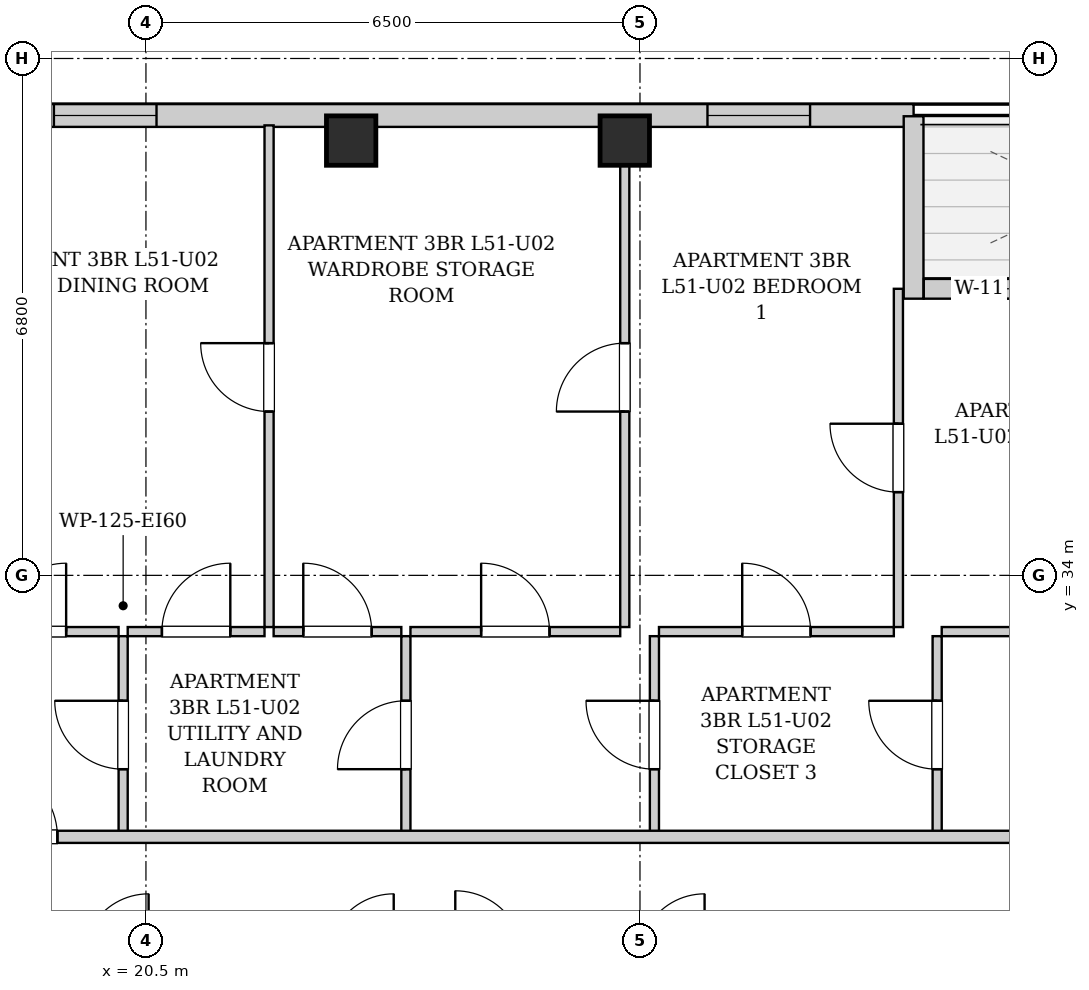
"""IFC4 building model, lengths in metres.
Left out: names, types, materials, properties, quantities, classifications, styles, units other than length and angle.
Written with IfcOpenShell. Run it as: python <this file> out.ifc"""

import sys

from ifc_helpers import new_model, si_unit, direction, frame, frame_2d, origin, origin_2d, place, context, subcontext, project, spatial, rectangle, extrude, element, fill, save


model = new_model("IFC4")
c1 = context("Model", 3, precision=1e-05, world=origin(), true_north=direction((0.0, 1.0)))
c2 = subcontext(c1, "Body", "Model", "MODEL_VIEW")
j1 = project(units=[si_unit("LENGTHUNIT", "METRE"), si_unit("PLANEANGLEUNIT", "RADIAN")], contexts=[c1])
p1 = place(None, origin())
s1 = spatial("IfcSite", under=j1, at=p1, CompositionType="ELEMENT")
p2 = place(p1, origin())
s2 = spatial("IfcBuilding", under=s1, at=p2, CompositionType="ELEMENT")
p3 = place(p2, frame((0.0, 0.0, 177.7)))
s3 = spatial("IfcBuildingStorey", under=s2, at=p3, CompositionType="ELEMENT", Elevation=177.7)
for number, where, z_axis, x_axis in (
    (1, (23.2, 39.72, 0.0), (0.0, 0.0, 1.0), (1.0, 0.0, 0.0)),
    (2, (26.8, 39.72, 0.0), (0.0, 0.0, 1.0), (1.0, 0.0, 0.0)),
):
    element("IfcColumn", number, at=place(p3, frame(where, z_axis=z_axis, x_axis=x_axis)), inside=s3, PredefinedType="COLUMN", context=c2, shape_type="SweptSolid", body=[
        extrude(rectangle(XDim=0.65, YDim=0.65, at=origin_2d()), origin(), (0.0, 0.0, 1.0), 3.3),
    ])
p4 = place(p3, frame((13.1, 40.05, 0.0), z_axis=(0.0, 0.0, 1.0), x_axis=(1.0, 0.0, 0.0)))
e3 = element("IfcWall", 3, at=p4, inside=s3, PredefinedType="SOLIDWALL", context=c2, shape_type="SweptSolid", body=[
    extrude(rectangle(XDim=17.5, YDim=0.3, at=frame_2d((8.75, 0.0))), origin(), (0.0, 0.0, 1.0), 3.04),
])
p5 = place(p4, frame((1.815, 0.0, 0.55)))
e4 = element("IfcOpeningElement", 4, at=p5, cuts=e3, PredefinedType="OPENING", context=c2, shape_type="SweptSolid", body=[
    extrude(rectangle(XDim=1.35, YDim=1.2, at=frame_2d((0.675, 0.6))), frame((0.0, 0.16, 0.0), z_axis=(0.0, -1.0, 0.0), x_axis=(1.0, 0.0, 0.0)), (0.0, 0.0, 1.0), 0.32),
])
p6 = place(p4, frame((6.189, 0.0, 0.55)))
e5 = element("IfcOpeningElement", 5, at=p6, cuts=e3, PredefinedType="OPENING", context=c2, shape_type="SweptSolid", body=[
    extrude(rectangle(XDim=1.35, YDim=1.2, at=frame_2d((0.675, 0.6))), frame((0.0, 0.16, 0.0), z_axis=(0.0, -1.0, 0.0), x_axis=(1.0, 0.0, 0.0)), (0.0, 0.0, 1.0), 0.32),
])
p7 = place(p4, frame((14.788, 0.0, 0.55)))
e6 = element("IfcOpeningElement", 6, at=p7, cuts=e3, PredefinedType="OPENING", context=c2, shape_type="SweptSolid", body=[
    extrude(rectangle(XDim=1.35, YDim=1.2, at=frame_2d((0.675, 0.6))), frame((0.0, 0.16, 0.0), z_axis=(0.0, -1.0, 0.0), x_axis=(1.0, 0.0, 0.0)), (0.0, 0.0, 1.0), 0.32),
])
p8 = place(p3, frame((30.6, 40.04, 0.0), z_axis=(0.0, 0.0, 1.0), x_axis=(0.0, -1.0, 0.0)))
e7 = element("IfcWall", 7, at=p8, inside=s3, PredefinedType="SOLIDWALL", context=c2, shape_type="SweptSolid", body=[
    extrude(rectangle(XDim=2.4, YDim=0.26, at=frame_2d((1.2, 0.0))), origin(), (0.0, 0.0, 1.0), 3.04),
])
p9 = place(p3, frame((30.734, 37.77, 0.0), z_axis=(0.0, 0.0, 1.0), x_axis=(1.0, 0.0, 0.0)))
e8 = element("IfcWall", 8, at=p9, inside=s3, PredefinedType="SOLIDWALL", context=c2, shape_type="SweptSolid", body=[
    extrude(rectangle(XDim=4.332, YDim=0.26, at=frame_2d((2.166, 0.0))), origin(), (0.0, 0.0, 1.0), 3.04),
])
p10 = place(p9, frame((1.616, 0.0, 0.0)))
e9 = element("IfcOpeningElement", 9, at=p10, cuts=e8, PredefinedType="OPENING", context=c2, shape_type="SweptSolid", body=[
    extrude(rectangle(XDim=1.1, YDim=2.0, at=frame_2d((0.55, 1.0))), frame((0.0, 0.14, 0.0), z_axis=(0.0, -1.0, 0.0), x_axis=(1.0, 0.0, 0.0)), (0.0, 0.0, 1.0), 0.28),
])
p11 = place(p9, frame((0.606, 0.0, 0.55)))
e10 = element("IfcOpeningElement", 10, at=p11, cuts=e8, PredefinedType="OPENING", context=c2, shape_type="SweptSolid", body=[
    extrude(rectangle(XDim=0.85, YDim=1.2, at=frame_2d((0.425, 0.6))), frame((0.0, 0.14, 0.0), z_axis=(0.0, -1.0, 0.0), x_axis=(1.0, 0.0, 0.0)), (0.0, 0.0, 1.0), 0.28),
])
p12 = place(p3, frame((20.2, 30.6, 0.0), z_axis=(0.0, 0.0, 1.0), x_axis=(0.0, 1.0, 0.0)))
e11 = element("IfcWall", 11, at=p12, inside=s3, PredefinedType="PARTITIONING", context=c2, shape_type="SweptSolid", body=[
    extrude(rectangle(XDim=2.6, YDim=0.12, at=frame_2d((1.3, 0.0))), origin(), (0.0, 0.0, 1.0), 3.04),
])
p13 = place(p12, frame((0.85, 0.0, 0.0)))
e12 = element("IfcOpeningElement", 12, at=p13, cuts=e11, PredefinedType="OPENING", context=c2, shape_type="SweptSolid", body=[
    extrude(rectangle(XDim=0.9, YDim=2.05, at=frame_2d((0.45, 1.025))), frame((0.0, 0.07, 0.0), z_axis=(0.0, -1.0, 0.0), x_axis=(1.0, 0.0, 0.0)), (0.0, 0.0, 1.0), 0.14),
])
p14 = place(p3, frame((17.86, 33.26, 0.0), z_axis=(0.0, 0.0, 1.0), x_axis=(1.0, 0.0, 0.0)))
e13 = element("IfcWall", 13, at=p14, inside=s3, PredefinedType="PARTITIONING", context=c2, shape_type="SweptSolid", body=[
    extrude(rectangle(XDim=2.28, YDim=0.12, at=frame_2d((1.14, 0.0))), origin(), (0.0, 0.0, 1.0), 3.04),
])
p15 = place(p14, frame((0.69, 0.0, 0.0)))
e14 = element("IfcOpeningElement", 14, at=p15, cuts=e13, PredefinedType="OPENING", context=c2, shape_type="SweptSolid", body=[
    extrude(rectangle(XDim=0.9, YDim=2.05, at=frame_2d((0.45, 1.025))), frame((0.0, 0.07, 0.0), z_axis=(0.0, -1.0, 0.0), x_axis=(1.0, 0.0, 0.0)), (0.0, 0.0, 1.0), 0.14),
])
p16 = place(p3, frame((23.92, 30.6, 0.0), z_axis=(0.0, 0.0, 1.0), x_axis=(0.0, 1.0, 0.0)))
e15 = element("IfcWall", 15, at=p16, inside=s3, PredefinedType="PARTITIONING", context=c2, shape_type="SweptSolid", body=[
    extrude(rectangle(XDim=2.6, YDim=0.12, at=frame_2d((1.3, 0.0))), origin(), (0.0, 0.0, 1.0), 3.04),
])
p17 = place(p16, frame((0.85, 0.0, 0.0)))
e16 = element("IfcOpeningElement", 16, at=p17, cuts=e15, PredefinedType="OPENING", context=c2, shape_type="SweptSolid", body=[
    extrude(rectangle(XDim=0.9, YDim=2.05, at=frame_2d((0.45, 1.025))), frame((0.0, 0.07, 0.0), z_axis=(0.0, -1.0, 0.0), x_axis=(1.0, 0.0, 0.0)), (0.0, 0.0, 1.0), 0.14),
])
p18 = place(p3, frame((20.26, 33.26, 0.0), z_axis=(0.0, 0.0, 1.0), x_axis=(1.0, 0.0, 0.0)))
e17 = element("IfcWall", 17, at=p18, inside=s3, PredefinedType="PARTITIONING", context=c2, shape_type="SweptSolid", body=[
    extrude(rectangle(XDim=1.8, YDim=0.12, at=frame_2d((0.9, 0.0))), origin(), (0.0, 0.0, 1.0), 3.04),
])
p19 = place(p18, frame((0.45, 0.0, 0.0)))
e18 = element("IfcOpeningElement", 18, at=p19, cuts=e17, PredefinedType="OPENING", context=c2, shape_type="SweptSolid", body=[
    extrude(rectangle(XDim=0.9, YDim=2.05, at=frame_2d((0.45, 1.025))), frame((0.0, 0.07, 0.0), z_axis=(0.0, -1.0, 0.0), x_axis=(1.0, 0.0, 0.0)), (0.0, 0.0, 1.0), 0.14),
])
p20 = place(p3, frame((22.18, 33.26, 0.0), z_axis=(0.0, 0.0, 1.0), x_axis=(1.0, 0.0, 0.0)))
e19 = element("IfcWall", 19, at=p20, inside=s3, PredefinedType="PARTITIONING", context=c2, shape_type="SweptSolid", body=[
    extrude(rectangle(XDim=1.68, YDim=0.12, at=frame_2d((0.84, 0.0))), origin(), (0.0, 0.0, 1.0), 3.04),
])
p21 = place(p20, frame((0.39, 0.0, 0.0)))
e20 = element("IfcOpeningElement", 20, at=p21, cuts=e19, PredefinedType="OPENING", context=c2, shape_type="SweptSolid", body=[
    extrude(rectangle(XDim=0.9, YDim=2.05, at=frame_2d((0.45, 1.025))), frame((0.0, 0.07, 0.0), z_axis=(0.0, -1.0, 0.0), x_axis=(1.0, 0.0, 0.0)), (0.0, 0.0, 1.0), 0.14),
])
p22 = place(p3, frame((27.19, 30.6, 0.0), z_axis=(0.0, 0.0, 1.0), x_axis=(0.0, 1.0, 0.0)))
e21 = element("IfcWall", 21, at=p22, inside=s3, PredefinedType="PARTITIONING", context=c2, shape_type="SweptSolid", body=[
    extrude(rectangle(XDim=2.6, YDim=0.12, at=frame_2d((1.3, 0.0))), origin(), (0.0, 0.0, 1.0), 3.04),
])
p23 = place(p22, frame((0.85, 0.0, 0.0)))
e22 = element("IfcOpeningElement", 22, at=p23, cuts=e21, PredefinedType="OPENING", context=c2, shape_type="SweptSolid", body=[
    extrude(rectangle(XDim=0.9, YDim=2.05, at=frame_2d((0.45, 1.025))), frame((0.0, 0.07, 0.0), z_axis=(0.0, -1.0, 0.0), x_axis=(1.0, 0.0, 0.0)), (0.0, 0.0, 1.0), 0.14),
])
p24 = place(p3, frame((23.98, 33.26, 0.0), z_axis=(0.0, 0.0, 1.0), x_axis=(1.0, 0.0, 0.0)))
e23 = element("IfcWall", 23, at=p24, inside=s3, PredefinedType="PARTITIONING", context=c2, shape_type="SweptSolid", body=[
    extrude(rectangle(XDim=2.76, YDim=0.12, at=frame_2d((1.38, 0.0))), origin(), (0.0, 0.0, 1.0), 3.04),
])
p25 = place(p24, frame((0.93, 0.0, 0.0)))
e24 = element("IfcOpeningElement", 24, at=p25, cuts=e23, PredefinedType="OPENING", context=c2, shape_type="SweptSolid", body=[
    extrude(rectangle(XDim=0.9, YDim=2.05, at=frame_2d((0.45, 1.025))), frame((0.0, 0.07, 0.0), z_axis=(0.0, -1.0, 0.0), x_axis=(1.0, 0.0, 0.0)), (0.0, 0.0, 1.0), 0.14),
])
p26 = place(p3, frame((30.91, 30.6, 0.0), z_axis=(0.0, 0.0, 1.0), x_axis=(0.0, 1.0, 0.0)))
e25 = element("IfcWall", 25, at=p26, inside=s3, PredefinedType="PARTITIONING", context=c2, shape_type="SweptSolid", body=[
    extrude(rectangle(XDim=2.6, YDim=0.12, at=frame_2d((1.3, 0.0))), origin(), (0.0, 0.0, 1.0), 3.04),
])
p27 = place(p26, frame((0.85, 0.0, 0.0)))
e26 = element("IfcOpeningElement", 26, at=p27, cuts=e25, PredefinedType="OPENING", context=c2, shape_type="SweptSolid", body=[
    extrude(rectangle(XDim=0.9, YDim=2.05, at=frame_2d((0.45, 1.025))), frame((0.0, 0.07, 0.0), z_axis=(0.0, -1.0, 0.0), x_axis=(1.0, 0.0, 0.0)), (0.0, 0.0, 1.0), 0.14),
])
p28 = place(p3, frame((27.25, 33.26, 0.0), z_axis=(0.0, 0.0, 1.0), x_axis=(1.0, 0.0, 0.0)))
e27 = element("IfcWall", 27, at=p28, inside=s3, PredefinedType="PARTITIONING", context=c2, shape_type="SweptSolid", body=[
    extrude(rectangle(XDim=3.09, YDim=0.12, at=frame_2d((1.545, 0.0))), origin(), (0.0, 0.0, 1.0), 3.04),
])
p29 = place(p28, frame((1.095, 0.0, 0.0)))
e28 = element("IfcOpeningElement", 28, at=p29, cuts=e27, PredefinedType="OPENING", context=c2, shape_type="SweptSolid", body=[
    extrude(rectangle(XDim=0.9, YDim=2.05, at=frame_2d((0.45, 1.025))), frame((0.0, 0.07, 0.0), z_axis=(0.0, -1.0, 0.0), x_axis=(1.0, 0.0, 0.0)), (0.0, 0.0, 1.0), 0.14),
])
p30 = place(p3, frame((30.97, 33.26, 0.0), z_axis=(0.0, 0.0, 1.0), x_axis=(1.0, 0.0, 0.0)))
e29 = element("IfcWall", 29, at=p30, inside=s3, PredefinedType="PARTITIONING", context=c2, shape_type="SweptSolid", body=[
    extrude(rectangle(XDim=3.15, YDim=0.12, at=frame_2d((1.575, 0.0))), origin(), (0.0, 0.0, 1.0), 3.04),
])
p31 = place(p30, frame((1.125, 0.0, 0.0)))
e30 = element("IfcOpeningElement", 30, at=p31, cuts=e29, PredefinedType="OPENING", context=c2, shape_type="SweptSolid", body=[
    extrude(rectangle(XDim=0.9, YDim=2.05, at=frame_2d((0.45, 1.025))), frame((0.0, 0.07, 0.0), z_axis=(0.0, -1.0, 0.0), x_axis=(1.0, 0.0, 0.0)), (0.0, 0.0, 1.0), 0.14),
])
p32 = place(p3, frame((22.12, 33.32, 0.0), z_axis=(0.0, 0.0, 1.0), x_axis=(0.0, 1.0, 0.0)))
e31 = element("IfcWall", 31, at=p32, inside=s3, PredefinedType="PARTITIONING", context=c2, shape_type="SweptSolid", body=[
    extrude(rectangle(XDim=6.6, YDim=0.12, at=frame_2d((3.3, 0.0))), origin(), (0.0, 0.0, 1.0), 3.04),
])
p33 = place(p32, frame((2.835, 0.0, 0.0)))
e32 = element("IfcOpeningElement", 32, at=p33, cuts=e31, PredefinedType="OPENING", context=c2, shape_type="SweptSolid", body=[
    extrude(rectangle(XDim=0.9, YDim=2.05, at=frame_2d((0.45, 1.025))), frame((0.0, 0.07, 0.0), z_axis=(0.0, -1.0, 0.0), x_axis=(1.0, 0.0, 0.0)), (0.0, 0.0, 1.0), 0.14),
])
p34 = place(p3, frame((26.8, 33.32, 0.0), z_axis=(0.0, 0.0, 1.0), x_axis=(0.0, 1.0, 0.0)))
e33 = element("IfcWall", 33, at=p34, inside=s3, PredefinedType="PARTITIONING", context=c2, shape_type="SweptSolid", body=[
    extrude(rectangle(XDim=6.6, YDim=0.12, at=frame_2d((3.3, 0.0))), origin(), (0.0, 0.0, 1.0), 3.04),
])
p35 = place(p34, frame((2.835, 0.0, 0.0)))
e34 = element("IfcOpeningElement", 34, at=p35, cuts=e33, PredefinedType="OPENING", context=c2, shape_type="SweptSolid", body=[
    extrude(rectangle(XDim=0.9, YDim=2.05, at=frame_2d((0.45, 1.025))), frame((0.0, 0.07, 0.0), z_axis=(0.0, -1.0, 0.0), x_axis=(1.0, 0.0, 0.0)), (0.0, 0.0, 1.0), 0.14),
])
p36 = place(p3, frame((30.4, 33.32, 0.0), z_axis=(0.0, 0.0, 1.0), x_axis=(0.0, 1.0, 0.0)))
e35 = element("IfcWall", 35, at=p36, inside=s3, PredefinedType="PARTITIONING", context=c2, shape_type="SweptSolid", body=[
    extrude(rectangle(XDim=4.45, YDim=0.12, at=frame_2d((2.225, 0.0))), origin(), (0.0, 0.0, 1.0), 3.04),
])
p37 = place(p36, frame((1.775, 0.0, 0.0)))
e36 = element("IfcOpeningElement", 36, at=p37, cuts=e35, PredefinedType="OPENING", context=c2, shape_type="SweptSolid", body=[
    extrude(rectangle(XDim=0.9, YDim=2.05, at=frame_2d((0.45, 1.025))), frame((0.0, 0.07, 0.0), z_axis=(0.0, -1.0, 0.0), x_axis=(1.0, 0.0, 0.0)), (0.0, 0.0, 1.0), 0.14),
])
p38 = place(p3, frame((13.15, 30.56, 0.0), z_axis=(0.0, 0.0, 1.0), x_axis=(1.0, 0.0, 0.0)))
e37 = element("IfcWall", 37, at=p38, inside=s3, PredefinedType="PARTITIONING", context=c2, shape_type="SweptSolid", body=[
    extrude(rectangle(XDim=24.6, YDim=0.16, at=frame_2d((12.3, 0.0))), origin(), (0.0, 0.0, 1.0), 3.04),
])
p39 = place(p38, frame((5.235, 0.0, 0.0)))
e38 = element("IfcOpeningElement", 38, at=p39, cuts=e37, PredefinedType="OPENING", context=c2, shape_type="SweptSolid", body=[
    extrude(rectangle(XDim=0.95, YDim=2.1, at=frame_2d((0.475, 1.05))), frame((0.0, 0.09, 0.0), z_axis=(0.0, -1.0, 0.0), x_axis=(1.0, 0.0, 0.0)), (0.0, 0.0, 1.0), 0.18),
])
p40 = place(p13, origin())
e39 = element("IfcDoor", 39, at=p40, inside=s3, OperationType="SINGLE_SWING_RIGHT", PredefinedType="DOOR", context=c2, shape_type="SweptSolid", body=[
    extrude(rectangle(XDim=0.9, YDim=2.05, at=frame_2d((0.45, 1.025))), frame((0.0, 0.025, 0.0), z_axis=(0.0, -1.0, 0.0), x_axis=(1.0, 0.0, 0.0)), (0.0, 0.0, 1.0), 0.05),
])
fill(e12, e39)
p41 = place(p15, origin())
e40 = element("IfcDoor", 40, at=p41, inside=s3, OperationType="SINGLE_SWING_RIGHT", PredefinedType="DOOR", context=c2, shape_type="SweptSolid", body=[
    extrude(rectangle(XDim=0.9, YDim=2.05, at=frame_2d((0.45, 1.025))), frame((0.0, 0.025, 0.0), z_axis=(0.0, -1.0, 0.0), x_axis=(1.0, 0.0, 0.0)), (0.0, 0.0, 1.0), 0.05),
])
fill(e14, e40)
p42 = place(p17, origin())
e41 = element("IfcDoor", 41, at=p42, inside=s3, OperationType="SINGLE_SWING_LEFT", PredefinedType="DOOR", context=c2, shape_type="SweptSolid", body=[
    extrude(rectangle(XDim=0.9, YDim=2.05, at=frame_2d((0.45, 1.025))), frame((0.0, 0.025, 0.0), z_axis=(0.0, -1.0, 0.0), x_axis=(1.0, 0.0, 0.0)), (0.0, 0.0, 1.0), 0.05),
])
fill(e16, e41)
p43 = place(p19, origin())
e42 = element("IfcDoor", 42, at=p43, inside=s3, OperationType="SINGLE_SWING_RIGHT", PredefinedType="DOOR", context=c2, shape_type="SweptSolid", body=[
    extrude(rectangle(XDim=0.9, YDim=2.05, at=frame_2d((0.45, 1.025))), frame((0.0, 0.025, 0.0), z_axis=(0.0, -1.0, 0.0), x_axis=(1.0, 0.0, 0.0)), (0.0, 0.0, 1.0), 0.05),
])
fill(e18, e42)
p44 = place(p21, origin())
e43 = element("IfcDoor", 43, at=p44, inside=s3, OperationType="SINGLE_SWING_LEFT", PredefinedType="DOOR", context=c2, shape_type="SweptSolid", body=[
    extrude(rectangle(XDim=0.9, YDim=2.05, at=frame_2d((0.45, 1.025))), frame((0.0, 0.025, 0.0), z_axis=(0.0, -1.0, 0.0), x_axis=(1.0, 0.0, 0.0)), (0.0, 0.0, 1.0), 0.05),
])
fill(e20, e43)
p45 = place(p23, origin())
e44 = element("IfcDoor", 44, at=p45, inside=s3, OperationType="SINGLE_SWING_RIGHT", PredefinedType="DOOR", context=c2, shape_type="SweptSolid", body=[
    extrude(rectangle(XDim=0.9, YDim=2.05, at=frame_2d((0.45, 1.025))), frame((0.0, 0.025, 0.0), z_axis=(0.0, -1.0, 0.0), x_axis=(1.0, 0.0, 0.0)), (0.0, 0.0, 1.0), 0.05),
])
fill(e22, e44)
p46 = place(p25, origin())
e45 = element("IfcDoor", 45, at=p46, inside=s3, OperationType="SINGLE_SWING_LEFT", PredefinedType="DOOR", context=c2, shape_type="SweptSolid", body=[
    extrude(rectangle(XDim=0.9, YDim=2.05, at=frame_2d((0.45, 1.025))), frame((0.0, 0.025, 0.0), z_axis=(0.0, -1.0, 0.0), x_axis=(1.0, 0.0, 0.0)), (0.0, 0.0, 1.0), 0.05),
])
fill(e24, e45)
p47 = place(p27, origin())
e46 = element("IfcDoor", 46, at=p47, inside=s3, OperationType="SINGLE_SWING_RIGHT", PredefinedType="DOOR", context=c2, shape_type="SweptSolid", body=[
    extrude(rectangle(XDim=0.9, YDim=2.05, at=frame_2d((0.45, 1.025))), frame((0.0, 0.025, 0.0), z_axis=(0.0, -1.0, 0.0), x_axis=(1.0, 0.0, 0.0)), (0.0, 0.0, 1.0), 0.05),
])
fill(e26, e46)
p48 = place(p29, origin())
e47 = element("IfcDoor", 47, at=p48, inside=s3, OperationType="SINGLE_SWING_LEFT", PredefinedType="DOOR", context=c2, shape_type="SweptSolid", body=[
    extrude(rectangle(XDim=0.9, YDim=2.05, at=frame_2d((0.45, 1.025))), frame((0.0, 0.025, 0.0), z_axis=(0.0, -1.0, 0.0), x_axis=(1.0, 0.0, 0.0)), (0.0, 0.0, 1.0), 0.05),
])
fill(e28, e47)
p49 = place(p33, origin())
e48 = element("IfcDoor", 48, at=p49, inside=s3, OperationType="SINGLE_SWING_RIGHT", PredefinedType="DOOR", context=c2, shape_type="SweptSolid", body=[
    extrude(rectangle(XDim=0.9, YDim=2.05, at=frame_2d((0.45, 1.025))), frame((0.0, 0.025, 0.0), z_axis=(0.0, -1.0, 0.0), x_axis=(1.0, 0.0, 0.0)), (0.0, 0.0, 1.0), 0.05),
])
fill(e32, e48)
p50 = place(p35, origin())
e49 = element("IfcDoor", 49, at=p50, inside=s3, OperationType="SINGLE_SWING_LEFT", PredefinedType="DOOR", context=c2, shape_type="SweptSolid", body=[
    extrude(rectangle(XDim=0.9, YDim=2.05, at=frame_2d((0.45, 1.025))), frame((0.0, 0.025, 0.0), z_axis=(0.0, -1.0, 0.0), x_axis=(1.0, 0.0, 0.0)), (0.0, 0.0, 1.0), 0.05),
])
fill(e34, e49)
p51 = place(p37, origin())
e50 = element("IfcDoor", 50, at=p51, inside=s3, OperationType="SINGLE_SWING_RIGHT", PredefinedType="DOOR", context=c2, shape_type="SweptSolid", body=[
    extrude(rectangle(XDim=0.9, YDim=2.05, at=frame_2d((0.45, 1.025))), frame((0.0, 0.025, 0.0), z_axis=(0.0, -1.0, 0.0), x_axis=(1.0, 0.0, 0.0)), (0.0, 0.0, 1.0), 0.05),
])
fill(e36, e50)
p52 = place(p39, origin())
e51 = element("IfcDoor", 51, at=p52, inside=s3, OperationType="SINGLE_SWING_LEFT", PredefinedType="DOOR", context=c2, shape_type="SweptSolid", body=[
    extrude(rectangle(XDim=0.95, YDim=2.1, at=frame_2d((0.475, 1.05))), frame((0.0, 0.025, 0.0), z_axis=(0.0, -1.0, 0.0), x_axis=(1.0, 0.0, 0.0)), (0.0, 0.0, 1.0), 0.05),
])
fill(e38, e51)
p53 = place(p6, origin())
e52 = element("IfcWindow", 52, at=p53, inside=s3, PartitioningType="SINGLE_PANEL", PredefinedType="WINDOW", context=c2, shape_type="SweptSolid", body=[
    extrude(rectangle(XDim=1.35, YDim=1.2, at=frame_2d((0.675, 0.6))), frame((0.0, 0.03, 0.0), z_axis=(0.0, -1.0, 0.0), x_axis=(1.0, 0.0, 0.0)), (0.0, 0.0, 1.0), 0.06),
])
fill(e5, e52)
p54 = place(p7, origin())
e53 = element("IfcWindow", 53, at=p54, inside=s3, PartitioningType="SINGLE_PANEL", PredefinedType="WINDOW", context=c2, shape_type="SweptSolid", body=[
    extrude(rectangle(XDim=1.35, YDim=1.2, at=frame_2d((0.675, 0.6))), frame((0.0, 0.03, 0.0), z_axis=(0.0, -1.0, 0.0), x_axis=(1.0, 0.0, 0.0)), (0.0, 0.0, 1.0), 0.06),
])
fill(e6, e53)
p55 = place(p11, origin())
e54 = element("IfcWindow", 54, at=p55, inside=s3, PartitioningType="SINGLE_PANEL", PredefinedType="WINDOW", context=c2, shape_type="SweptSolid", body=[
    extrude(rectangle(XDim=0.85, YDim=1.2, at=frame_2d((0.425, 0.6))), frame((0.0, 0.03, 0.0), z_axis=(0.0, -1.0, 0.0), x_axis=(1.0, 0.0, 0.0)), (0.0, 0.0, 1.0), 0.06),
])
fill(e10, e54)
save(model, sys.argv[1])
